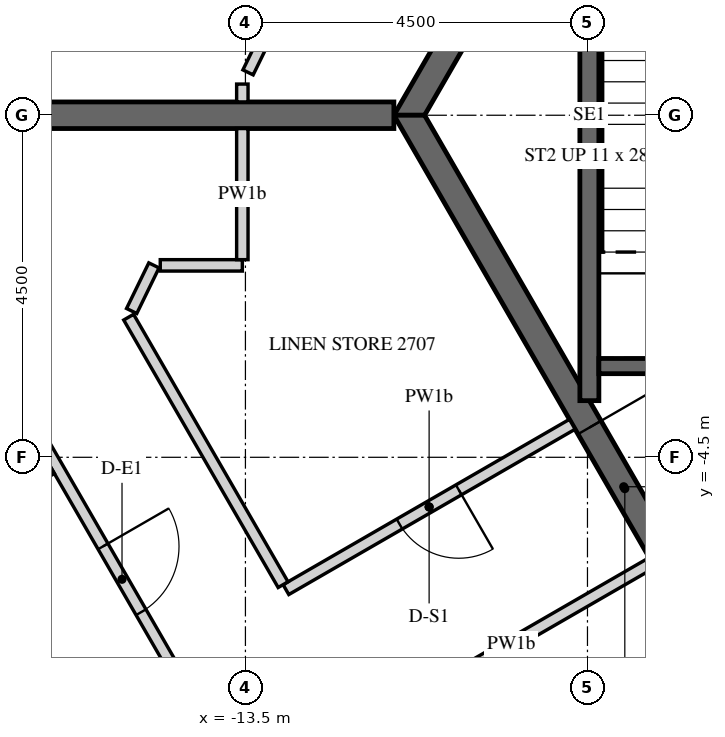
"""IFC4 building model, lengths in metres.
Left out: names, types, materials, properties, quantities, classifications, styles, units other than length and angle.
Written with IfcOpenShell. Run it as: python <this file> out.ifc"""

import sys

from ifc_helpers import new_model, si_unit, direction, frame, frame_2d, origin, place, context, subcontext, project, spatial, polyline, rectangle, outline, extrude, element, fill, save


model = new_model("IFC4")
c1 = context("Model", 3, precision=1e-05, world=origin(), true_north=direction((0.0, 1.0)))
c2 = subcontext(c1, "Body", "Model", "MODEL_VIEW")
j1 = project(units=[si_unit("LENGTHUNIT", "METRE"), si_unit("PLANEANGLEUNIT", "RADIAN")], contexts=[c1])
p1 = place(None, origin())
s1 = spatial("IfcSite", under=j1, at=p1, CompositionType="ELEMENT")
p2 = place(p1, origin())
s2 = spatial("IfcBuilding", under=s1, at=p2, CompositionType="ELEMENT")
p3 = place(p2, frame((0.0, 0.0, 353.4)))
s3 = spatial("IfcBuildingStorey", under=s2, at=p3, CompositionType="ELEMENT", Elevation=353.4)
p4 = place(p3, frame((-14.619, 19.699, -0.15), z_axis=(0.0, 0.0, 1.0), x_axis=(-0.438373747484, -0.898792777851, 0.0)))
e1 = element("IfcWall", 1, at=p4, inside=s3, PredefinedType="SOLIDWALL", context=c2, shape_type="SweptSolid", body=[
    extrude(outline(polyline([(0.225, -0.225), (20.506, -0.225), (20.957, 0.225), (-0.225, 0.225), (0.225, -0.225)])), origin(), (0.0, 0.0, 1.0), 3.9),
])
p5 = place(p4, frame((0.325, 0.0, 1.05)))
e2 = element("IfcOpeningElement", 2, at=p5, cuts=e1, PredefinedType="OPENING", context=c2, shape_type="SweptSolid", body=[
    extrude(rectangle(XDim=0.9, YDim=1.5, at=frame_2d((0.45, 0.75))), frame((0.0, 0.235, 0.0), z_axis=(0.0, -1.0, 0.0), x_axis=(1.0, 0.0, 0.0)), (0.0, 0.0, 1.0), 0.47),
])
p6 = place(p4, frame((1.525, 0.0, 0.15)))
e3 = element("IfcOpeningElement", 3, at=p6, cuts=e1, PredefinedType="OPENING", context=c2, shape_type="SweptSolid", body=[
    extrude(rectangle(XDim=1.2, YDim=2.4, at=frame_2d((0.6, 1.2))), frame((0.0, 0.235, 0.0), z_axis=(0.0, -1.0, 0.0), x_axis=(1.0, 0.0, 0.0)), (0.0, 0.0, 1.0), 0.47),
])
p7 = place(p4, frame((3.766, 0.0, 1.05)))
e4 = element("IfcOpeningElement", 4, at=p7, cuts=e1, PredefinedType="OPENING", context=c2, shape_type="SweptSolid", body=[
    extrude(rectangle(XDim=0.9, YDim=1.5, at=frame_2d((0.45, 0.75))), frame((0.0, 0.235, 0.0), z_axis=(0.0, -1.0, 0.0), x_axis=(1.0, 0.0, 0.0)), (0.0, 0.0, 1.0), 0.47),
])
p8 = place(p4, frame((4.966, 0.0, 0.15)))
e5 = element("IfcOpeningElement", 5, at=p8, cuts=e1, PredefinedType="OPENING", context=c2, shape_type="SweptSolid", body=[
    extrude(rectangle(XDim=1.2, YDim=2.4, at=frame_2d((0.6, 1.2))), frame((0.0, 0.235, 0.0), z_axis=(0.0, -1.0, 0.0), x_axis=(1.0, 0.0, 0.0)), (0.0, 0.0, 1.0), 0.47),
])
p9 = place(p4, frame((7.366, 0.0, 1.05)))
e6 = element("IfcOpeningElement", 6, at=p9, cuts=e1, PredefinedType="OPENING", context=c2, shape_type="SweptSolid", body=[
    extrude(rectangle(XDim=0.9, YDim=1.5, at=frame_2d((0.45, 0.75))), frame((0.0, 0.235, 0.0), z_axis=(0.0, -1.0, 0.0), x_axis=(1.0, 0.0, 0.0)), (0.0, 0.0, 1.0), 0.47),
])
p10 = place(p4, frame((8.566, 0.0, 0.15)))
e7 = element("IfcOpeningElement", 7, at=p10, cuts=e1, PredefinedType="OPENING", context=c2, shape_type="SweptSolid", body=[
    extrude(rectangle(XDim=1.2, YDim=2.4, at=frame_2d((0.6, 1.2))), frame((0.0, 0.235, 0.0), z_axis=(0.0, -1.0, 0.0), x_axis=(1.0, 0.0, 0.0)), (0.0, 0.0, 1.0), 0.47),
])
p11 = place(p4, frame((10.966, 0.0, 1.05)))
e8 = element("IfcOpeningElement", 8, at=p11, cuts=e1, PredefinedType="OPENING", context=c2, shape_type="SweptSolid", body=[
    extrude(rectangle(XDim=0.9, YDim=1.5, at=frame_2d((0.45, 0.75))), frame((0.0, 0.235, 0.0), z_axis=(0.0, -1.0, 0.0), x_axis=(1.0, 0.0, 0.0)), (0.0, 0.0, 1.0), 0.47),
])
p12 = place(p4, frame((12.166, 0.0, 0.15)))
e9 = element("IfcOpeningElement", 9, at=p12, cuts=e1, PredefinedType="OPENING", context=c2, shape_type="SweptSolid", body=[
    extrude(rectangle(XDim=1.2, YDim=2.4, at=frame_2d((0.6, 1.2))), frame((0.0, 0.235, 0.0), z_axis=(0.0, -1.0, 0.0), x_axis=(1.0, 0.0, 0.0)), (0.0, 0.0, 1.0), 0.47),
])
p13 = place(p4, frame((14.566, 0.0, 1.05)))
e10 = element("IfcOpeningElement", 10, at=p13, cuts=e1, PredefinedType="OPENING", context=c2, shape_type="SweptSolid", body=[
    extrude(rectangle(XDim=0.9, YDim=1.5, at=frame_2d((0.45, 0.75))), frame((0.0, 0.235, 0.0), z_axis=(0.0, -1.0, 0.0), x_axis=(1.0, 0.0, 0.0)), (0.0, 0.0, 1.0), 0.47),
])
p14 = place(p4, frame((15.766, 0.0, 0.15)))
e11 = element("IfcOpeningElement", 11, at=p14, cuts=e1, PredefinedType="OPENING", context=c2, shape_type="SweptSolid", body=[
    extrude(rectangle(XDim=1.2, YDim=2.4, at=frame_2d((0.6, 1.2))), frame((0.0, 0.235, 0.0), z_axis=(0.0, -1.0, 0.0), x_axis=(1.0, 0.0, 0.0)), (0.0, 0.0, 1.0), 0.47),
])
p15 = place(p4, frame((18.007, 0.0, 1.05)))
e12 = element("IfcOpeningElement", 12, at=p15, cuts=e1, PredefinedType="OPENING", context=c2, shape_type="SweptSolid", body=[
    extrude(rectangle(XDim=0.9, YDim=1.5, at=frame_2d((0.45, 0.75))), frame((0.0, 0.235, 0.0), z_axis=(0.0, -1.0, 0.0), x_axis=(1.0, 0.0, 0.0)), (0.0, 0.0, 1.0), 0.47),
])
p16 = place(p4, frame((19.207, 0.0, 0.15)))
e13 = element("IfcOpeningElement", 13, at=p16, cuts=e1, PredefinedType="OPENING", context=c2, shape_type="SweptSolid", body=[
    extrude(rectangle(XDim=1.2, YDim=2.4, at=frame_2d((0.6, 1.2))), frame((0.0, 0.235, 0.0), z_axis=(0.0, -1.0, 0.0), x_axis=(1.0, 0.0, 0.0)), (0.0, 0.0, 1.0), 0.47),
])
p17 = place(p3, frame((-25.907, -2.678, -0.15), z_axis=(0.0, 0.0, 1.0), x_axis=(0.499997453958, -0.866026873738, 0.0)))
e14 = element("IfcWall", 14, at=p17, inside=s3, PredefinedType="SOLIDWALL", context=c2, shape_type="SweptSolid", body=[
    extrude(outline(polyline([(-0.018, -0.225), (23.152, -0.225), (23.11, 0.225), (0.018, 0.225), (-0.018, -0.225)])), origin(), (0.0, 0.0, 1.0), 3.9),
])
p18 = place(p17, frame((1.366, 0.0, 0.45)))
e15 = element("IfcOpeningElement", 15, at=p18, cuts=e14, PredefinedType="OPENING", context=c2, shape_type="SweptSolid", body=[
    extrude(rectangle(XDim=2.4, YDim=3.0, at=frame_2d((1.2, 1.5))), frame((0.0, 0.235, 0.0), z_axis=(0.0, -1.0, 0.0), x_axis=(1.0, 0.0, 0.0)), (0.0, 0.0, 1.0), 0.47),
])
p19 = place(p17, frame((4.966, 0.0, 0.45)))
e16 = element("IfcOpeningElement", 16, at=p19, cuts=e14, PredefinedType="OPENING", context=c2, shape_type="SweptSolid", body=[
    extrude(rectangle(XDim=2.4, YDim=3.0, at=frame_2d((1.2, 1.5))), frame((0.0, 0.235, 0.0), z_axis=(0.0, -1.0, 0.0), x_axis=(1.0, 0.0, 0.0)), (0.0, 0.0, 1.0), 0.47),
])
p20 = place(p17, frame((8.566, 0.0, 0.45)))
e17 = element("IfcOpeningElement", 17, at=p20, cuts=e14, PredefinedType="OPENING", context=c2, shape_type="SweptSolid", body=[
    extrude(rectangle(XDim=2.4, YDim=3.0, at=frame_2d((1.2, 1.5))), frame((0.0, 0.235, 0.0), z_axis=(0.0, -1.0, 0.0), x_axis=(1.0, 0.0, 0.0)), (0.0, 0.0, 1.0), 0.47),
])
p21 = place(p17, frame((12.166, 0.0, 0.45)))
e18 = element("IfcOpeningElement", 18, at=p21, cuts=e14, PredefinedType="OPENING", context=c2, shape_type="SweptSolid", body=[
    extrude(rectangle(XDim=2.4, YDim=3.0, at=frame_2d((1.2, 1.5))), frame((0.0, 0.235, 0.0), z_axis=(0.0, -1.0, 0.0), x_axis=(1.0, 0.0, 0.0)), (0.0, 0.0, 1.0), 0.47),
])
p22 = place(p17, frame((15.766, 0.0, 0.45)))
e19 = element("IfcOpeningElement", 19, at=p22, cuts=e14, PredefinedType="OPENING", context=c2, shape_type="SweptSolid", body=[
    extrude(rectangle(XDim=2.4, YDim=3.0, at=frame_2d((1.2, 1.5))), frame((0.0, 0.235, 0.0), z_axis=(0.0, -1.0, 0.0), x_axis=(1.0, 0.0, 0.0)), (0.0, 0.0, 1.0), 0.47),
])
p23 = place(p17, frame((19.366, 0.0, 0.45)))
e20 = element("IfcOpeningElement", 20, at=p23, cuts=e14, PredefinedType="OPENING", context=c2, shape_type="SweptSolid", body=[
    extrude(rectangle(XDim=2.4, YDim=3.0, at=frame_2d((1.2, 1.5))), frame((0.0, 0.235, 0.0), z_axis=(0.0, -1.0, 0.0), x_axis=(1.0, 0.0, 0.0)), (0.0, 0.0, 1.0), 0.47),
])
p24 = place(p3, frame((-5.673, 9.825, -0.15), z_axis=(0.0, 0.0, 1.0), x_axis=(-0.499995046907, -0.866028263435, 0.0)))
e21 = element("IfcWall", 21, at=p24, inside=s3, PredefinedType="SHEAR", context=c2, shape_type="SweptSolid", body=[
    extrude(outline(polyline([(-0.101, -0.175), (11.446, -0.175), (11.244, 0.175), (0.101, 0.175), (-0.101, -0.175)])), origin(), (0.0, 0.0, 1.0), 3.9),
])
p25 = place(p24, frame((4.801, 0.0, 0.15)))
e22 = element("IfcOpeningElement", 22, at=p25, cuts=e21, PredefinedType="OPENING", context=c2, shape_type="SweptSolid", body=[
    extrude(rectangle(XDim=1.8, YDim=2.4, at=frame_2d((0.9, 1.2))), frame((0.0, 0.185, 0.0), z_axis=(0.0, -1.0, 0.0), x_axis=(1.0, 0.0, 0.0)), (0.0, 0.0, 1.0), 0.37),
])
p26 = place(p3, frame((-11.345, 0.0, -0.15), z_axis=(0.0, 0.0, 1.0), x_axis=(0.499995046907, -0.866028263435, 0.0)))
e23 = element("IfcWall", 23, at=p26, inside=s3, PredefinedType="SHEAR", context=c2, shape_type="SweptSolid", body=[
    extrude(outline(polyline([(-0.101, -0.175), (11.446, -0.175), (11.244, 0.175), (0.101, 0.175), (-0.101, -0.175)])), origin(), (0.0, 0.0, 1.0), 3.9),
])
p27 = place(p26, frame((4.744, 0.0, 0.15)))
e24 = element("IfcOpeningElement", 24, at=p27, cuts=e23, PredefinedType="OPENING", context=c2, shape_type="SweptSolid", body=[
    extrude(rectangle(XDim=1.8, YDim=2.4, at=frame_2d((0.9, 1.2))), frame((0.0, 0.185, 0.0), z_axis=(0.0, -1.0, 0.0), x_axis=(1.0, 0.0, 0.0)), (0.0, 0.0, 1.0), 0.37),
])
p28 = place(p3, frame((-11.547, 0.0, -0.15), z_axis=(0.0, 0.0, 1.0), x_axis=(-1.0, 0.0, 0.0)))
e25 = element("IfcWall", 25, at=p28, inside=s3, PredefinedType="SHEAR", context=c2, shape_type="SweptSolid", body=[
    extrude(rectangle(XDim=14.51, YDim=0.35, at=frame_2d((7.255, 0.0))), origin(), (0.0, 0.0, 1.0), 3.9),
])
p29 = place(p28, frame((6.355, 0.0, 0.15)))
e26 = element("IfcOpeningElement", 26, at=p29, cuts=e25, PredefinedType="OPENING", context=c2, shape_type="SweptSolid", body=[
    extrude(rectangle(XDim=1.8, YDim=2.4, at=frame_2d((0.9, 1.2))), frame((0.0, 0.185, 0.0), z_axis=(0.0, -1.0, 0.0), x_axis=(1.0, 0.0, 0.0)), (0.0, 0.0, 1.0), 0.37),
])
p30 = place(p3, frame((-8.975, -3.755, -0.25), z_axis=(0.0, 0.0, 1.0), x_axis=(0.0, 1.0, 0.0)))
e27 = element("IfcWall", 27, at=p30, inside=s3, PredefinedType="SHEAR", context=c2, shape_type="SweptSolid", body=[
    extrude(rectangle(XDim=7.51, YDim=0.25, at=frame_2d((3.755, 0.0))), origin(), (0.0, 0.0, 1.0), 3.9),
])
p31 = place(p3, frame((-8.85, -3.3, -0.25), z_axis=(0.0, 0.0, 1.0), x_axis=(1.0, 0.0, 0.0)))
e28 = element("IfcWall", 28, at=p31, inside=s3, PredefinedType="SHEAR", context=c2, shape_type="SweptSolid", body=[
    extrude(rectangle(XDim=2.95, YDim=0.2, at=frame_2d((1.475, 0.0))), origin(), (0.0, 0.0, 1.0), 3.9),
])
p32 = place(p31, frame((0.875, 0.0, 0.25)))
e29 = element("IfcOpeningElement", 29, at=p32, cuts=e28, PredefinedType="OPENING", context=c2, shape_type="SweptSolid", body=[
    extrude(rectangle(XDim=1.2, YDim=2.4, at=frame_2d((0.6, 1.2))), frame((0.0, 0.11, 0.0), z_axis=(0.0, -1.0, 0.0), x_axis=(1.0, 0.0, 0.0)), (0.0, 0.0, 1.0), 0.22),
])
p33 = place(p3, frame((-13.541, 0.175, 0.0), z_axis=(0.0, 0.0, 1.0), x_axis=(0.0, 1.0, 0.0)))
e30 = element("IfcWall", 30, at=p33, inside=s3, PredefinedType="PARTITIONING", context=c2, shape_type="SweptSolid", body=[
    extrude(rectangle(XDim=0.235, YDim=0.15, at=frame_2d((0.118, 0.0))), origin(), (0.0, 0.0, 1.0), 2.82),
])
p34 = place(p3, frame((-13.466, 0.564, 0.0), z_axis=(0.0, 0.0, 1.0), x_axis=(0.438366040624, 0.898796536724, 0.0)))
e31 = element("IfcWall", 31, at=p34, inside=s3, PredefinedType="PARTITIONING", context=c2, shape_type="SweptSolid", body=[
    extrude(rectangle(XDim=5.178, YDim=0.15, at=frame_2d((2.589, 0.0))), origin(), (0.0, 0.0, 1.0), 2.82),
])
p35 = place(p3, frame((-17.036, -2.792, 0.0), z_axis=(0.0, 0.0, 1.0), x_axis=(0.500006428338, -0.86602169235, 0.0)))
e32 = element("IfcWall", 32, at=p35, inside=s3, PredefinedType="PARTITIONING", context=c2, shape_type="SweptSolid", body=[
    extrude(rectangle(XDim=13.966, YDim=0.15, at=frame_2d((6.983, 0.0))), origin(), (0.0, 0.0, 1.0), 2.82),
])
p36 = place(p35, frame((3.325, 0.0, 0.0)))
e33 = element("IfcOpeningElement", 33, at=p36, cuts=e32, PredefinedType="OPENING", context=c2, shape_type="SweptSolid", body=[
    extrude(rectangle(XDim=1.0, YDim=2.1, at=frame_2d((0.5, 1.05))), frame((0.0, 0.085, 0.0), z_axis=(0.0, -1.0, 0.0), x_axis=(1.0, 0.0, 0.0)), (0.0, 0.0, 1.0), 0.17),
])
p37 = place(p3, frame((-9.2, -4.066, 0.0), z_axis=(0.0, 0.0, 1.0), x_axis=(-0.866013608182, -0.500020430026, 0.0)))
e34 = element("IfcWall", 34, at=p37, inside=s3, PredefinedType="PARTITIONING", context=c2, shape_type="SweptSolid", body=[
    extrude(rectangle(XDim=4.35, YDim=0.15, at=frame_2d((2.175, 0.0))), origin(), (0.0, 0.0, 1.0), 2.82),
])
p38 = place(p37, frame((1.725, 0.0, 0.0)))
e35 = element("IfcOpeningElement", 35, at=p38, cuts=e34, PredefinedType="OPENING", context=c2, shape_type="SweptSolid", body=[
    extrude(rectangle(XDim=0.9, YDim=2.1, at=frame_2d((0.45, 1.05))), frame((0.0, 0.085, 0.0), z_axis=(0.0, -1.0, 0.0), x_axis=(1.0, 0.0, 0.0)), (0.0, 0.0, 1.0), 0.17),
])
p39 = place(p3, frame((-13.004, -6.176, 0.0), z_axis=(0.0, 0.0, 1.0), x_axis=(-0.500022342669, 0.866012503854, 0.0)))
e36 = element("IfcWall", 36, at=p39, inside=s3, PredefinedType="PARTITIONING", context=c2, shape_type="SweptSolid", body=[
    extrude(rectangle(XDim=4.064, YDim=0.15, at=frame_2d((2.032, 0.0))), origin(), (0.0, 0.0, 1.0), 2.82),
])
p40 = place(p3, frame((-14.997, -2.575, 0.0), z_axis=(0.0, 0.0, 1.0), x_axis=(0.438416427913, 0.898771959808, 0.0)))
e37 = element("IfcWall", 37, at=p40, inside=s3, PredefinedType="PARTITIONING", context=c2, shape_type="SweptSolid", body=[
    extrude(rectangle(XDim=0.668, YDim=0.15, at=frame_2d((0.334, 0.0))), origin(), (0.0, 0.0, 1.0), 2.82),
])
p41 = place(p3, frame((-14.62, -1.975, 0.0), z_axis=(0.0, 0.0, 1.0), x_axis=(1.0, 0.0, 0.0)))
e38 = element("IfcWall", 38, at=p41, inside=s3, PredefinedType="PARTITIONING", context=c2, shape_type="SweptSolid", body=[
    extrude(rectangle(XDim=1.08, YDim=0.15, at=frame_2d((0.54, 0.0))), origin(), (0.0, 0.0, 1.0), 2.82),
])
p42 = place(p3, frame((-13.541, -1.9, 0.0), z_axis=(0.0, 0.0, 1.0), x_axis=(0.0, 1.0, 0.0)))
e39 = element("IfcWall", 39, at=p42, inside=s3, PredefinedType="PARTITIONING", context=c2, shape_type="SweptSolid", body=[
    extrude(rectangle(XDim=1.725, YDim=0.15, at=frame_2d((0.862, 0.0))), origin(), (0.0, 0.0, 1.0), 2.82),
])
p43 = place(p3, frame((-11.852, -8.022, 0.0), z_axis=(0.0, 0.0, 1.0), x_axis=(0.866038183914, 0.499977863513, 0.0)))
e40 = element("IfcWall", 40, at=p43, inside=s3, PredefinedType="PARTITIONING", context=c2, shape_type="SweptSolid", body=[
    extrude(rectangle(XDim=4.275, YDim=0.15, at=frame_2d((2.138, 0.0))), origin(), (0.0, 0.0, 1.0), 2.82),
])
p44 = place(p3, frame((-16.039, -4.67, 0.0), z_axis=(0.0, 0.0, 1.0), x_axis=(-0.866031034943, -0.499990246421, 0.0)))
e41 = element("IfcWall", 41, at=p44, inside=s3, PredefinedType="PARTITIONING", context=c2, shape_type="SweptSolid", body=[
    extrude(rectangle(XDim=3.525, YDim=0.1, at=frame_2d((1.762, 0.0))), origin(), (0.0, 0.0, 1.0), 2.82),
])
p45 = place(p44, frame((1.325, 0.0, 0.0)))
e42 = element("IfcOpeningElement", 42, at=p45, cuts=e41, PredefinedType="OPENING", context=c2, shape_type="SweptSolid", body=[
    extrude(rectangle(XDim=0.8, YDim=2.1, at=frame_2d((0.4, 1.05))), frame((0.0, 0.06, 0.0), z_axis=(0.0, -1.0, 0.0), x_axis=(1.0, 0.0, 0.0)), (0.0, 0.0, 1.0), 0.12),
])
p46 = place(p27, origin())
e43 = element("IfcDoor", 43, at=p46, inside=s3, OperationType="DOUBLE_DOOR_SINGLE_SWING", PredefinedType="DOOR", context=c2, shape_type="SweptSolid", body=[
    extrude(rectangle(XDim=1.8, YDim=2.4, at=frame_2d((0.9, 1.2))), frame((0.0, 0.025, 0.0), z_axis=(0.0, -1.0, 0.0), x_axis=(1.0, 0.0, 0.0)), (0.0, 0.0, 1.0), 0.05),
])
fill(e24, e43)
p47 = place(p36, origin())
e44 = element("IfcDoor", 44, at=p47, inside=s3, OperationType="SINGLE_SWING_RIGHT", PredefinedType="DOOR", context=c2, shape_type="SweptSolid", body=[
    extrude(rectangle(XDim=1.0, YDim=2.1, at=frame_2d((0.5, 1.05))), frame((0.0, 0.025, 0.0), z_axis=(0.0, -1.0, 0.0), x_axis=(1.0, 0.0, 0.0)), (0.0, 0.0, 1.0), 0.05),
])
fill(e33, e44)
p48 = place(p38, origin())
e45 = element("IfcDoor", 45, at=p48, inside=s3, OperationType="SINGLE_SWING_LEFT", PredefinedType="DOOR", context=c2, shape_type="SweptSolid", body=[
    extrude(rectangle(XDim=0.9, YDim=2.1, at=frame_2d((0.45, 1.05))), frame((0.0, 0.025, 0.0), z_axis=(0.0, -1.0, 0.0), x_axis=(1.0, 0.0, 0.0)), (0.0, 0.0, 1.0), 0.05),
])
fill(e35, e45)
save(model, sys.argv[1])
